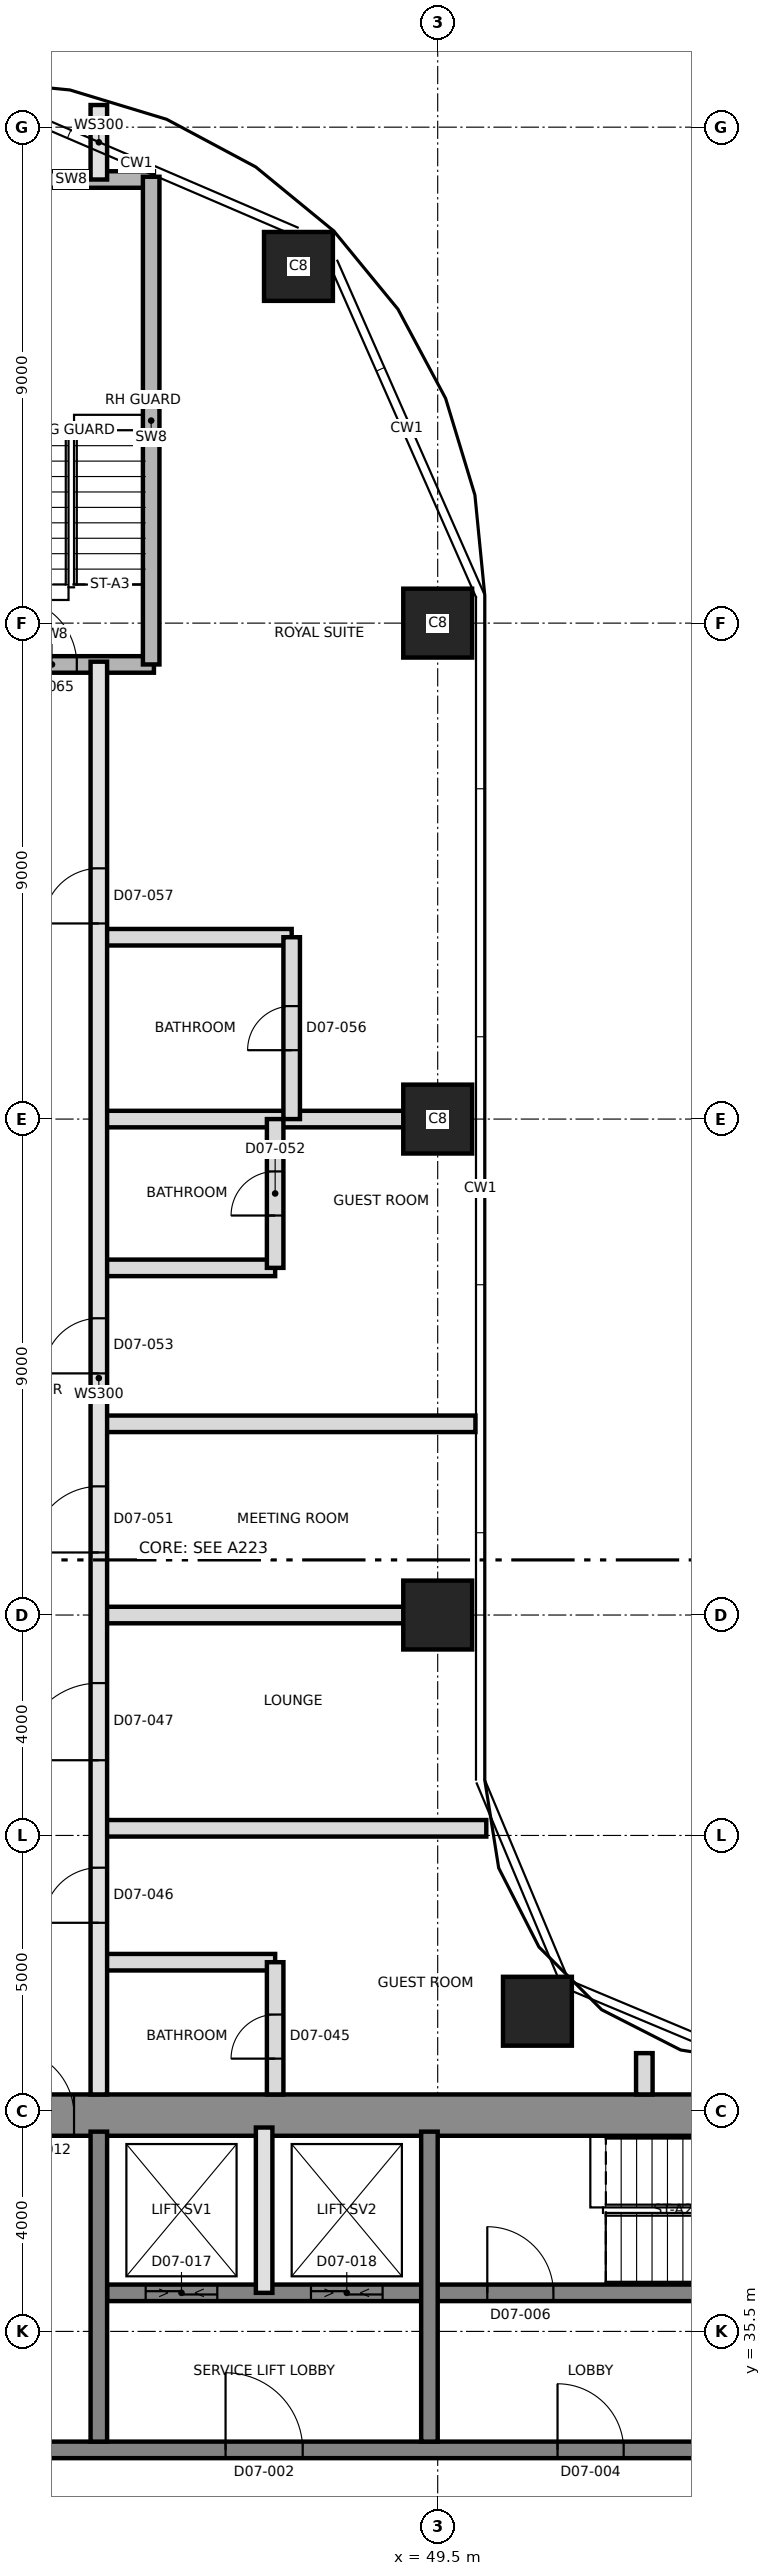
"""IFC4 building model, lengths in metres.
Left out: names, types, materials, properties, quantities, classifications, styles, units other than length and angle.
Written with IfcOpenShell. Run it as: python <this file> out.ifc"""

import sys

from ifc_helpers import new_model, si_unit, direction, frame, frame_2d, origin, origin_2d, place, context, subcontext, project, spatial, rectangle, extrude, element, fill, save


model = new_model("IFC4")
c1 = context("Model", 3, precision=1e-05, world=origin(), true_north=direction((0.0, 1.0)))
c2 = subcontext(c1, "Body", "Model", "MODEL_VIEW")
j1 = project(units=[si_unit("LENGTHUNIT", "METRE"), si_unit("PLANEANGLEUNIT", "RADIAN")], contexts=[c1])
p1 = place(None, origin())
s1 = spatial("IfcSite", under=j1, at=p1, CompositionType="ELEMENT")
p2 = place(p1, origin())
s2 = spatial("IfcBuilding", under=s1, at=p2, CompositionType="ELEMENT")
p3 = place(p2, frame((0.0, 0.0, 87.1)))
s3 = spatial("IfcBuildingStorey", under=s2, at=p3, CompositionType="ELEMENT", Elevation=87.1)
p4 = place(p3, frame((31.125, 39.425, 0.0), z_axis=(0.0, 0.0, 1.0), x_axis=(1.0, 0.0, 0.0)))
e1 = element("IfcWall", 1, at=p4, inside=s3, PredefinedType="SHEAR", context=c2, shape_type="SweptSolid", body=[
    extrude(rectangle(XDim=27.0, YDim=0.75, at=frame_2d((13.5, 0.0))), origin(), (0.0, 0.0, 1.0), 3.7),
])
p5 = place(p4, frame((10.575, 0.0, 0.0)))
e2 = element("IfcOpeningElement", 2, at=p5, cuts=e1, PredefinedType="OPENING", context=c2, shape_type="SweptSolid", body=[
    extrude(rectangle(XDim=1.2, YDim=2.1, at=frame_2d((0.6, 1.05))), frame((0.0, 0.385, 0.0), z_axis=(0.0, -1.0, 0.0), x_axis=(1.0, 0.0, 0.0)), (0.0, 0.0, 1.0), 0.77),
])
p6 = place(p3, frame((31.875, 33.35, 0.0), z_axis=(0.0, 0.0, 1.0), x_axis=(1.0, 0.0, 0.0)))
e3 = element("IfcWall", 3, at=p6, inside=s3, PredefinedType="SHEAR", context=c2, shape_type="SweptSolid", body=[
    extrude(rectangle(XDim=26.25, YDim=0.3, at=frame_2d((13.125, 0.0))), origin(), (0.0, 0.0, 1.0), 3.7),
])
p7 = place(p6, frame((13.775, 0.0, 0.0)))
e4 = element("IfcOpeningElement", 4, at=p7, cuts=e3, PredefinedType="OPENING", context=c2, shape_type="SweptSolid", body=[
    extrude(rectangle(XDim=1.4, YDim=2.1, at=frame_2d((0.7, 1.05))), frame((0.0, 0.16, 0.0), z_axis=(0.0, -1.0, 0.0), x_axis=(1.0, 0.0, 0.0)), (0.0, 0.0, 1.0), 0.32),
])
p8 = place(p6, frame((5.25, 0.0, 0.0)))
e5 = element("IfcOpeningElement", 5, at=p8, cuts=e3, PredefinedType="OPENING", context=c2, shape_type="SweptSolid", body=[
    extrude(rectangle(XDim=1.2, YDim=2.1, at=frame_2d((0.6, 1.05))), frame((0.0, 0.16, 0.0), z_axis=(0.0, -1.0, 0.0), x_axis=(1.0, 0.0, 0.0)), (0.0, 0.0, 1.0), 0.32),
])
p9 = place(p6, frame((19.8, 0.0, 0.0)))
e6 = element("IfcOpeningElement", 6, at=p9, cuts=e3, PredefinedType="OPENING", context=c2, shape_type="SweptSolid", body=[
    extrude(rectangle(XDim=1.2, YDim=2.1, at=frame_2d((0.6, 1.05))), frame((0.0, 0.16, 0.0), z_axis=(0.0, -1.0, 0.0), x_axis=(1.0, 0.0, 0.0)), (0.0, 0.0, 1.0), 0.32),
])
p10 = place(p3, frame((43.5, 36.2, 0.0), z_axis=(0.0, 0.0, 1.0), x_axis=(1.0, 0.0, 0.0)))
e7 = element("IfcWall", 7, at=p10, inside=s3, PredefinedType="SHEAR", context=c2, shape_type="SweptSolid", body=[
    extrude(rectangle(XDim=14.625, YDim=0.3, at=frame_2d((7.312, 0.0))), origin(), (0.0, 0.0, 1.0), 3.7),
])
p11 = place(p10, frame((6.9, 0.0, 0.0)))
e8 = element("IfcOpeningElement", 8, at=p11, cuts=e7, PredefinedType="OPENING", context=c2, shape_type="SweptSolid", body=[
    extrude(rectangle(XDim=1.2, YDim=2.1, at=frame_2d((0.6, 1.05))), frame((0.0, 0.16, 0.0), z_axis=(0.0, -1.0, 0.0), x_axis=(1.0, 0.0, 0.0)), (0.0, 0.0, 1.0), 0.32),
])
p12 = place(p10, frame((0.7, 0.0, 0.0)))
e9 = element("IfcOpeningElement", 9, at=p12, cuts=e7, PredefinedType="OPENING", context=c2, shape_type="SweptSolid", body=[
    extrude(rectangle(XDim=1.3, YDim=2.4, at=frame_2d((0.65, 1.2))), frame((0.0, 0.16, 0.0), z_axis=(0.0, -1.0, 0.0), x_axis=(1.0, 0.0, 0.0)), (0.0, 0.0, 1.0), 0.32),
])
p13 = place(p10, frame((3.7, 0.0, 0.0)))
e10 = element("IfcOpeningElement", 10, at=p13, cuts=e7, PredefinedType="OPENING", context=c2, shape_type="SweptSolid", body=[
    extrude(rectangle(XDim=1.3, YDim=2.4, at=frame_2d((0.65, 1.2))), frame((0.0, 0.16, 0.0), z_axis=(0.0, -1.0, 0.0), x_axis=(1.0, 0.0, 0.0)), (0.0, 0.0, 1.0), 0.32),
])
for number, where, z_axis, x_axis in (
    (11, (43.35, 33.5, 0.0), (0.0, 0.0, 1.0), (0.0, 1.0, 0.0)),
    (12, (49.35, 33.5, 0.0), (0.0, 0.0, 1.0), (0.0, 1.0, 0.0)),
):
    element("IfcWall", number, at=place(p3, frame(where, z_axis=z_axis, x_axis=x_axis)), inside=s3, PredefinedType="SHEAR", context=c2, shape_type="SweptSolid", body=[
        extrude(rectangle(XDim=5.625, YDim=0.3, at=frame_2d((2.812, 0.0))), origin(), (0.0, 0.0, 1.0), 3.7),
    ])
for number, where, z_axis, x_axis in (
    (13, (51.31, 41.31, 0.0), (0.0, 0.0, 1.0), (1.0, 0.0, 0.0)),
    (14, (49.5, 48.5, 0.0), (0.0, 0.0, 1.0), (1.0, 0.0, 0.0)),
    (15, (49.5, 57.5, 0.0), (0.0, 0.0, 1.0), (1.0, 0.0, 0.0)),
    (16, (49.5, 66.5, 0.0), (0.0, 0.0, 1.0), (1.0, 0.0, 0.0)),
    (17, (46.973, 72.973, 0.0), (0.0, 0.0, 1.0), (1.0, 0.0, 0.0)),
):
    element("IfcColumn", number, at=place(p3, frame(where, z_axis=z_axis, x_axis=x_axis)), inside=s3, PredefinedType="COLUMN", context=c2, shape_type="SweptSolid", body=[
        extrude(rectangle(XDim=1.25, YDim=1.25, at=origin_2d()), origin(), (0.0, 0.0, 1.0), 3.7),
    ])
p14 = place(p3, frame((46.35, 36.2, 0.0), z_axis=(0.0, 0.0, 1.0), x_axis=(0.0, 1.0, 0.0)))
e18 = element("IfcWall", 18, at=p14, inside=s3, PredefinedType="SOLIDWALL", context=c2, shape_type="SweptSolid", body=[
    extrude(rectangle(XDim=3.0, YDim=0.3, at=frame_2d((1.5, 0.0))), origin(), (0.0, 0.0, 1.0), 3.4),
])
p15 = place(p3, frame((43.35, 42.2, 0.0), z_axis=(0.0, 0.0, 1.0), x_axis=(1.0, 0.0, 0.0)))
e19 = element("IfcWall", 19, at=p15, inside=s3, PredefinedType="PARTITIONING", context=c2, shape_type="SweptSolid", body=[
    extrude(rectangle(XDim=3.2, YDim=0.3, at=frame_2d((1.6, 0.0))), origin(), (0.0, 0.0, 1.0), 3.4),
])
p16 = place(p3, frame((43.35, 44.63, 0.0), z_axis=(0.0, 0.0, 1.0), x_axis=(1.0, 0.0, 0.0)))
e20 = element("IfcWall", 20, at=p16, inside=s3, PredefinedType="PARTITIONING", context=c2, shape_type="SweptSolid", body=[
    extrude(rectangle(XDim=7.032, YDim=0.3, at=frame_2d((3.516, 0.0))), origin(), (0.0, 0.0, 1.0), 3.4),
])
p17 = place(p3, frame((43.35, 48.5, 0.0), z_axis=(0.0, 0.0, 1.0), x_axis=(1.0, 0.0, 0.0)))
e21 = element("IfcWall", 21, at=p17, inside=s3, PredefinedType="PARTITIONING", context=c2, shape_type="SweptSolid", body=[
    extrude(rectangle(XDim=6.655, YDim=0.3, at=frame_2d((3.327, 0.0))), origin(), (0.0, 0.0, 1.0), 3.4),
])
p18 = place(p3, frame((43.35, 51.97, 0.0), z_axis=(0.0, 0.0, 1.0), x_axis=(1.0, 0.0, 0.0)))
e22 = element("IfcWall", 22, at=p18, inside=s3, PredefinedType="PARTITIONING", context=c2, shape_type="SweptSolid", body=[
    extrude(rectangle(XDim=6.835, YDim=0.3, at=frame_2d((3.417, 0.0))), origin(), (0.0, 0.0, 1.0), 3.4),
])
p19 = place(p3, frame((43.35, 54.8, 0.0), z_axis=(0.0, 0.0, 1.0), x_axis=(1.0, 0.0, 0.0)))
e23 = element("IfcWall", 23, at=p19, inside=s3, PredefinedType="PARTITIONING", context=c2, shape_type="SweptSolid", body=[
    extrude(rectangle(XDim=3.2, YDim=0.3, at=frame_2d((1.6, 0.0))), origin(), (0.0, 0.0, 1.0), 3.4),
])
p20 = place(p3, frame((43.35, 57.5, 0.0), z_axis=(0.0, 0.0, 1.0), x_axis=(1.0, 0.0, 0.0)))
e24 = element("IfcWall", 24, at=p20, inside=s3, PredefinedType="PARTITIONING", context=c2, shape_type="SweptSolid", body=[
    extrude(rectangle(XDim=6.655, YDim=0.3, at=frame_2d((3.327, 0.0))), origin(), (0.0, 0.0, 1.0), 3.4),
])
p21 = place(p3, frame((43.35, 60.8, 0.0), z_axis=(0.0, 0.0, 1.0), x_axis=(1.0, 0.0, 0.0)))
e25 = element("IfcWall", 25, at=p21, inside=s3, PredefinedType="PARTITIONING", context=c2, shape_type="SweptSolid", body=[
    extrude(rectangle(XDim=3.5, YDim=0.3, at=frame_2d((1.75, 0.0))), origin(), (0.0, 0.0, 1.0), 3.4),
])
p22 = place(p3, frame((40.65, 65.75, 0.0), z_axis=(0.0, 0.0, 1.0), x_axis=(1.0, 0.0, 0.0)))
e26 = element("IfcWall", 26, at=p22, inside=s3, PredefinedType="SHEAR", context=c2, shape_type="SweptSolid", body=[
    extrude(rectangle(XDim=3.7, YDim=0.3, at=frame_2d((1.85, 0.0))), origin(), (0.0, 0.0, 1.0), 3.4),
])
p23 = place(p22, frame((1.1, 0.0, 0.0)))
e27 = element("IfcOpeningElement", 27, at=p23, cuts=e26, PredefinedType="OPENING", context=c2, shape_type="SweptSolid", body=[
    extrude(rectangle(XDim=1.2, YDim=2.1, at=frame_2d((0.6, 1.05))), frame((0.0, 0.16, 0.0), z_axis=(0.0, -1.0, 0.0), x_axis=(1.0, 0.0, 0.0)), (0.0, 0.0, 1.0), 0.32),
])
p24 = place(p3, frame((41.35, 74.55, 0.0), z_axis=(0.0, 0.0, 1.0), x_axis=(1.0, 0.0, 0.0)))
e28 = element("IfcWall", 28, at=p24, inside=s3, PredefinedType="SHEAR", context=c2, shape_type="SweptSolid", body=[
    extrude(rectangle(XDim=3.0, YDim=0.3, at=frame_2d((1.5, 0.0))), origin(), (0.0, 0.0, 1.0), 3.4),
])
p25 = place(p3, frame((43.35, 39.8, 0.0), z_axis=(0.0, 0.0, 1.0), x_axis=(0.0, 1.0, 0.0)))
e29 = element("IfcWall", 29, at=p25, inside=s3, PredefinedType="SOLIDWALL", context=c2, shape_type="SweptSolid", body=[
    extrude(rectangle(XDim=26.0, YDim=0.3, at=frame_2d((13.0, 0.0))), origin(), (0.0, 0.0, 1.0), 3.4),
])
p26 = place(p25, frame((3.115, 0.0, 0.0)))
e30 = element("IfcOpeningElement", 30, at=p26, cuts=e29, PredefinedType="OPENING", context=c2, shape_type="SweptSolid", body=[
    extrude(rectangle(XDim=1.0, YDim=2.1, at=frame_2d((0.5, 1.05))), frame((0.0, 0.16, 0.0), z_axis=(0.0, -1.0, 0.0), x_axis=(1.0, 0.0, 0.0)), (0.0, 0.0, 1.0), 0.32),
])
p27 = place(p25, frame((6.065, 0.0, 0.0)))
e31 = element("IfcOpeningElement", 31, at=p27, cuts=e29, PredefinedType="OPENING", context=c2, shape_type="SweptSolid", body=[
    extrude(rectangle(XDim=1.4, YDim=2.1, at=frame_2d((0.7, 1.05))), frame((0.0, 0.16, 0.0), z_axis=(0.0, -1.0, 0.0), x_axis=(1.0, 0.0, 0.0)), (0.0, 0.0, 1.0), 0.32),
])
p28 = place(p25, frame((9.835, 0.0, 0.0)))
e32 = element("IfcOpeningElement", 32, at=p28, cuts=e29, PredefinedType="OPENING", context=c2, shape_type="SweptSolid", body=[
    extrude(rectangle(XDim=1.2, YDim=2.1, at=frame_2d((0.6, 1.05))), frame((0.0, 0.16, 0.0), z_axis=(0.0, -1.0, 0.0), x_axis=(1.0, 0.0, 0.0)), (0.0, 0.0, 1.0), 0.32),
])
p29 = place(p25, frame((13.085, 0.0, 0.0)))
e33 = element("IfcOpeningElement", 33, at=p29, cuts=e29, PredefinedType="OPENING", context=c2, shape_type="SweptSolid", body=[
    extrude(rectangle(XDim=1.0, YDim=2.1, at=frame_2d((0.5, 1.05))), frame((0.0, 0.16, 0.0), z_axis=(0.0, -1.0, 0.0), x_axis=(1.0, 0.0, 0.0)), (0.0, 0.0, 1.0), 0.32),
])
p30 = place(p25, frame((21.25, 0.0, 0.0)))
e34 = element("IfcOpeningElement", 34, at=p30, cuts=e29, PredefinedType="OPENING", context=c2, shape_type="SweptSolid", body=[
    extrude(rectangle(XDim=1.0, YDim=2.4, at=frame_2d((0.5, 1.2))), frame((0.0, 0.16, 0.0), z_axis=(0.0, -1.0, 0.0), x_axis=(1.0, 0.0, 0.0)), (0.0, 0.0, 1.0), 0.32),
])
p31 = place(p3, frame((43.35, 74.55, 0.0), z_axis=(0.0, 0.0, 1.0), x_axis=(0.0, 1.0, 0.0)))
e35 = element("IfcWall", 35, at=p31, inside=s3, PredefinedType="SOLIDWALL", context=c2, shape_type="SweptSolid", body=[
    extrude(rectangle(XDim=1.352, YDim=0.3, at=frame_2d((0.676, 0.0))), origin(), (0.0, 0.0, 1.0), 3.4),
])
p32 = place(p3, frame((44.3, 65.75, 0.0), z_axis=(0.0, 0.0, 1.0), x_axis=(0.0, 1.0, 0.0)))
e36 = element("IfcWall", 36, at=p32, inside=s3, PredefinedType="SHEAR", context=c2, shape_type="SweptSolid", body=[
    extrude(rectangle(XDim=8.85, YDim=0.3, at=frame_2d((4.425, 0.0))), origin(), (0.0, 0.0, 1.0), 3.4),
])
p33 = place(p3, frame((46.55, 39.8, 0.0), z_axis=(0.0, 0.0, 1.0), x_axis=(0.0, 1.0, 0.0)))
e37 = element("IfcWall", 37, at=p33, inside=s3, PredefinedType="PARTITIONING", context=c2, shape_type="SweptSolid", body=[
    extrude(rectangle(XDim=2.4, YDim=0.3, at=frame_2d((1.2, 0.0))), origin(), (0.0, 0.0, 1.0), 3.4),
])
p34 = place(p33, frame((0.65, 0.0, 0.0)))
e38 = element("IfcOpeningElement", 38, at=p34, cuts=e37, PredefinedType="OPENING", context=c2, shape_type="SweptSolid", body=[
    extrude(rectangle(XDim=0.8, YDim=2.1, at=frame_2d((0.4, 1.05))), frame((0.0, 0.16, 0.0), z_axis=(0.0, -1.0, 0.0), x_axis=(1.0, 0.0, 0.0)), (0.0, 0.0, 1.0), 0.32),
])
p35 = place(p3, frame((46.55, 54.8, 0.0), z_axis=(0.0, 0.0, 1.0), x_axis=(0.0, 1.0, 0.0)))
e39 = element("IfcWall", 39, at=p35, inside=s3, PredefinedType="PARTITIONING", context=c2, shape_type="SweptSolid", body=[
    extrude(rectangle(XDim=2.7, YDim=0.3, at=frame_2d((1.35, 0.0))), origin(), (0.0, 0.0, 1.0), 3.4),
])
p36 = place(p35, frame((0.95, 0.0, 0.0)))
e40 = element("IfcOpeningElement", 40, at=p36, cuts=e39, PredefinedType="OPENING", context=c2, shape_type="SweptSolid", body=[
    extrude(rectangle(XDim=0.8, YDim=2.1, at=frame_2d((0.4, 1.05))), frame((0.0, 0.16, 0.0), z_axis=(0.0, -1.0, 0.0), x_axis=(1.0, 0.0, 0.0)), (0.0, 0.0, 1.0), 0.32),
])
p37 = place(p3, frame((46.85, 57.5, 0.0), z_axis=(0.0, 0.0, 1.0), x_axis=(0.0, 1.0, 0.0)))
e41 = element("IfcWall", 41, at=p37, inside=s3, PredefinedType="PARTITIONING", context=c2, shape_type="SweptSolid", body=[
    extrude(rectangle(XDim=3.3, YDim=0.3, at=frame_2d((1.65, 0.0))), origin(), (0.0, 0.0, 1.0), 3.4),
])
p38 = place(p37, frame((1.25, 0.0, 0.0)))
e42 = element("IfcOpeningElement", 42, at=p38, cuts=e41, PredefinedType="OPENING", context=c2, shape_type="SweptSolid", body=[
    extrude(rectangle(XDim=0.8, YDim=2.1, at=frame_2d((0.4, 1.05))), frame((0.0, 0.16, 0.0), z_axis=(0.0, -1.0, 0.0), x_axis=(1.0, 0.0, 0.0)), (0.0, 0.0, 1.0), 0.32),
])
p39 = place(p3, frame((53.25, 39.8, 0.0), z_axis=(0.0, 0.0, 1.0), x_axis=(0.0, 1.0, 0.0)))
e43 = element("IfcWall", 43, at=p39, inside=s3, PredefinedType="PARTITIONING", context=c2, shape_type="SweptSolid", body=[
    extrude(rectangle(XDim=0.75, YDim=0.3, at=frame_2d((0.375, 0.0))), origin(), (0.0, 0.0, 1.0), 3.4),
])
p40 = place(p7, origin())
e44 = element("IfcDoor", 44, at=p40, inside=s3, OperationType="SINGLE_SWING_RIGHT", PredefinedType="DOOR", context=c2, shape_type="SweptSolid", body=[
    extrude(rectangle(XDim=1.4, YDim=2.1, at=frame_2d((0.7, 1.05))), frame((0.0, 0.025, 0.0), z_axis=(0.0, -1.0, 0.0), x_axis=(1.0, 0.0, 0.0)), (0.0, 0.0, 1.0), 0.05),
])
fill(e4, e44)
p41 = place(p9, origin())
e45 = element("IfcDoor", 45, at=p41, inside=s3, OperationType="SINGLE_SWING_RIGHT", PredefinedType="DOOR", context=c2, shape_type="SweptSolid", body=[
    extrude(rectangle(XDim=1.2, YDim=2.1, at=frame_2d((0.6, 1.05))), frame((0.0, 0.025, 0.0), z_axis=(0.0, -1.0, 0.0), x_axis=(1.0, 0.0, 0.0)), (0.0, 0.0, 1.0), 0.05),
])
fill(e6, e45)
p42 = place(p11, origin())
e46 = element("IfcDoor", 46, at=p42, inside=s3, OperationType="SINGLE_SWING_LEFT", PredefinedType="DOOR", context=c2, shape_type="SweptSolid", body=[
    extrude(rectangle(XDim=1.2, YDim=2.1, at=frame_2d((0.6, 1.05))), frame((0.0, 0.025, 0.0), z_axis=(0.0, -1.0, 0.0), x_axis=(1.0, 0.0, 0.0)), (0.0, 0.0, 1.0), 0.05),
])
fill(e8, e46)
p43 = place(p5, origin())
e47 = element("IfcDoor", 47, at=p43, inside=s3, OperationType="SINGLE_SWING_RIGHT", PredefinedType="DOOR", context=c2, shape_type="SweptSolid", body=[
    extrude(rectangle(XDim=1.2, YDim=2.1, at=frame_2d((0.6, 1.05))), frame((0.0, 0.025, 0.0), z_axis=(0.0, -1.0, 0.0), x_axis=(1.0, 0.0, 0.0)), (0.0, 0.0, 1.0), 0.05),
])
fill(e2, e47)
p44 = place(p12, origin())
e48 = element("IfcDoor", 48, at=p44, inside=s3, OperationType="SLIDING_TO_LEFT", PredefinedType="DOOR", context=c2, shape_type="SweptSolid", body=[
    extrude(rectangle(XDim=1.3, YDim=2.4, at=frame_2d((0.65, 1.2))), frame((0.0, 0.025, 0.0), z_axis=(0.0, -1.0, 0.0), x_axis=(1.0, 0.0, 0.0)), (0.0, 0.0, 1.0), 0.05),
])
fill(e9, e48)
p45 = place(p13, origin())
e49 = element("IfcDoor", 49, at=p45, inside=s3, OperationType="SLIDING_TO_LEFT", PredefinedType="DOOR", context=c2, shape_type="SweptSolid", body=[
    extrude(rectangle(XDim=1.3, YDim=2.4, at=frame_2d((0.65, 1.2))), frame((0.0, 0.025, 0.0), z_axis=(0.0, -1.0, 0.0), x_axis=(1.0, 0.0, 0.0)), (0.0, 0.0, 1.0), 0.05),
])
fill(e10, e49)
p46 = place(p34, origin())
e50 = element("IfcDoor", 50, at=p46, inside=s3, OperationType="SINGLE_SWING_RIGHT", PredefinedType="DOOR", context=c2, shape_type="SweptSolid", body=[
    extrude(rectangle(XDim=0.8, YDim=2.1, at=frame_2d((0.4, 1.05))), frame((0.0, 0.025, 0.0), z_axis=(0.0, -1.0, 0.0), x_axis=(1.0, 0.0, 0.0)), (0.0, 0.0, 1.0), 0.05),
])
fill(e38, e50)
p47 = place(p26, origin())
e51 = element("IfcDoor", 51, at=p47, inside=s3, OperationType="SINGLE_SWING_LEFT", PredefinedType="DOOR", context=c2, shape_type="SweptSolid", body=[
    extrude(rectangle(XDim=1.0, YDim=2.1, at=frame_2d((0.5, 1.05))), frame((0.0, 0.025, 0.0), z_axis=(0.0, -1.0, 0.0), x_axis=(1.0, 0.0, 0.0)), (0.0, 0.0, 1.0), 0.05),
])
fill(e30, e51)
p48 = place(p27, origin())
e52 = element("IfcDoor", 52, at=p48, inside=s3, OperationType="SINGLE_SWING_LEFT", PredefinedType="DOOR", context=c2, shape_type="SweptSolid", body=[
    extrude(rectangle(XDim=1.4, YDim=2.1, at=frame_2d((0.7, 1.05))), frame((0.0, 0.025, 0.0), z_axis=(0.0, -1.0, 0.0), x_axis=(1.0, 0.0, 0.0)), (0.0, 0.0, 1.0), 0.05),
])
fill(e31, e52)
p49 = place(p28, origin())
e53 = element("IfcDoor", 53, at=p49, inside=s3, OperationType="SINGLE_SWING_LEFT", PredefinedType="DOOR", context=c2, shape_type="SweptSolid", body=[
    extrude(rectangle(XDim=1.2, YDim=2.1, at=frame_2d((0.6, 1.05))), frame((0.0, 0.025, 0.0), z_axis=(0.0, -1.0, 0.0), x_axis=(1.0, 0.0, 0.0)), (0.0, 0.0, 1.0), 0.05),
])
fill(e32, e53)
p50 = place(p36, origin())
e54 = element("IfcDoor", 54, at=p50, inside=s3, OperationType="SINGLE_SWING_LEFT", PredefinedType="DOOR", context=c2, shape_type="SweptSolid", body=[
    extrude(rectangle(XDim=0.8, YDim=2.1, at=frame_2d((0.4, 1.05))), frame((0.0, 0.025, 0.0), z_axis=(0.0, -1.0, 0.0), x_axis=(1.0, 0.0, 0.0)), (0.0, 0.0, 1.0), 0.05),
])
fill(e40, e54)
p51 = place(p29, origin())
e55 = element("IfcDoor", 55, at=p51, inside=s3, OperationType="SINGLE_SWING_RIGHT", PredefinedType="DOOR", context=c2, shape_type="SweptSolid", body=[
    extrude(rectangle(XDim=1.0, YDim=2.1, at=frame_2d((0.5, 1.05))), frame((0.0, 0.025, 0.0), z_axis=(0.0, -1.0, 0.0), x_axis=(1.0, 0.0, 0.0)), (0.0, 0.0, 1.0), 0.05),
])
fill(e33, e55)
p52 = place(p38, origin())
e56 = element("IfcDoor", 56, at=p52, inside=s3, OperationType="SINGLE_SWING_LEFT", PredefinedType="DOOR", context=c2, shape_type="SweptSolid", body=[
    extrude(rectangle(XDim=0.8, YDim=2.1, at=frame_2d((0.4, 1.05))), frame((0.0, 0.025, 0.0), z_axis=(0.0, -1.0, 0.0), x_axis=(1.0, 0.0, 0.0)), (0.0, 0.0, 1.0), 0.05),
])
fill(e42, e56)
p53 = place(p30, origin())
e57 = element("IfcDoor", 57, at=p53, inside=s3, OperationType="SINGLE_SWING_LEFT", PredefinedType="DOOR", context=c2, shape_type="SweptSolid", body=[
    extrude(rectangle(XDim=1.0, YDim=2.4, at=frame_2d((0.5, 1.2))), frame((0.0, 0.025, 0.0), z_axis=(0.0, -1.0, 0.0), x_axis=(1.0, 0.0, 0.0)), (0.0, 0.0, 1.0), 0.05),
])
fill(e34, e57)
p54 = place(p23, origin())
e58 = element("IfcDoor", 58, at=p54, inside=s3, OperationType="SINGLE_SWING_RIGHT", PredefinedType="DOOR", context=c2, shape_type="SweptSolid", body=[
    extrude(rectangle(XDim=1.2, YDim=2.1, at=frame_2d((0.6, 1.05))), frame((0.0, 0.025, 0.0), z_axis=(0.0, -1.0, 0.0), x_axis=(1.0, 0.0, 0.0)), (0.0, 0.0, 1.0), 0.05),
])
fill(e27, e58)
save(model, sys.argv[1])
